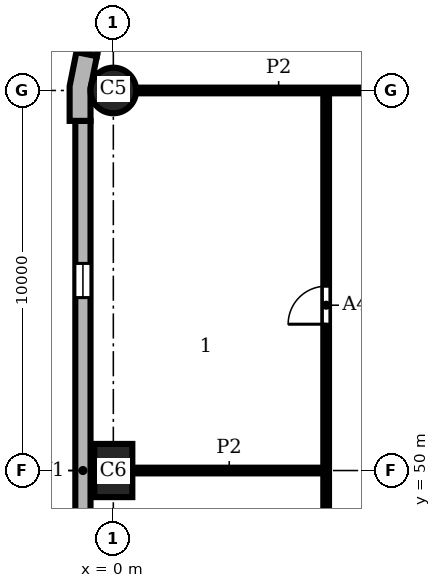
"""IFC4 building model, lengths in metres.
Left out: names, types, materials, properties, quantities, classifications, styles, units other than length and angle.
Written with IfcOpenShell. Run it as: python <this file> out.ifc"""

import sys

from ifc_helpers import new_model, si_unit, direction, frame, frame_2d, origin, origin_2d, place, context, subcontext, project, spatial, polyline, rectangle, circle, outline, extrude, element, fill, save


model = new_model("IFC4")
c1 = context("Model", 3, precision=1e-05, world=origin(), true_north=direction((0.0, 1.0)))
c2 = subcontext(c1, "Body", "Model", "MODEL_VIEW")
j1 = project(units=[si_unit("LENGTHUNIT", "METRE"), si_unit("PLANEANGLEUNIT", "RADIAN")], contexts=[c1])
p1 = place(None, origin())
s1 = spatial("IfcSite", under=j1, at=p1, CompositionType="ELEMENT")
p2 = place(p1, origin())
s2 = spatial("IfcBuilding", under=s1, at=p2, CompositionType="ELEMENT")
p3 = place(p2, frame((0.0, 0.0, 47.1)))
s3 = spatial("IfcBuildingStorey", under=s2, at=p3, CompositionType="ELEMENT", Elevation=47.1)
p4 = place(p3, frame((0.0, 60.0, 0.0), z_axis=(0.0, 0.0, 1.0), x_axis=(1.0, 0.0, 0.0)))
e1 = element("IfcColumn", 1, at=p4, inside=s3, PredefinedType="COLUMN", context=c2, shape_type="SweptSolid", body=[
    extrude(circle(Radius=0.6, at=origin_2d()), origin(), (0.0, 0.0, 1.0), 3.9),
])
p5 = place(p3, frame((0.0, 50.0, 0.0), z_axis=(0.0, 0.0, 1.0), x_axis=(0.0, 1.0, 0.0)))
e2 = element("IfcColumn", 2, at=p5, inside=s3, PredefinedType="COLUMN", context=c2, shape_type="SweptSolid", body=[
    extrude(rectangle(XDim=1.4, YDim=1.0, at=origin_2d()), origin(), (0.0, 0.0, 1.0), 3.9),
])
p6 = place(p3, origin())
e3 = element("IfcWall", 3, at=p6, inside=s3, PredefinedType="SOLIDWALL", context=c2, shape_type="SweptSolid", body=[
    extrude(outline(polyline([(-0.825, 60.98), (-0.972, 61.009), (-1.15, 60.113), (-1.15, 59.2), (-1.0, 59.2), (-0.6, 59.2), (-0.6, 60.059), (-0.432, 60.902), (-0.825, 60.98)])), origin(), (0.0, 0.0, 1.0), 3.9),
])
p7 = place(p3, frame((0.299, 65.602, 0.0), z_axis=(0.0, 0.0, 1.0), x_axis=(-0.195098533057, -0.98078364709, 0.0)))
e4 = element("IfcWall", 4, at=p7, inside=s3, PredefinedType="SOLIDWALL", context=c2, shape_type="SweptSolid", body=[
    extrude(rectangle(XDim=4.753, YDim=0.4, at=frame_2d((2.376, 0.0))), origin(), (0.0, 0.0, 1.0), 3.9),
])
p8 = place(p7, frame((0.226, 0.0, 0.9)))
e5 = element("IfcOpeningElement", 5, at=p8, cuts=e4, PredefinedType="OPENING", context=c2, shape_type="SweptSolid", body=[
    extrude(rectangle(XDim=4.3, YDim=2.35, at=frame_2d((2.15, 1.175))), frame((0.0, 0.21, 0.0), z_axis=(0.0, -1.0, 0.0), x_axis=(1.0, 0.0, 0.0)), (0.0, 0.0, 1.0), 0.42),
])
p9 = place(p3, frame((-0.8, 59.2, 0.0), z_axis=(0.0, 0.0, 1.0), x_axis=(0.0, -1.0, 0.0)))
e6 = element("IfcWall", 6, at=p9, inside=s3, PredefinedType="SOLIDWALL", context=c2, shape_type="SweptSolid", body=[
    extrude(rectangle(XDim=18.4, YDim=0.4, at=frame_2d((9.2, 0.0))), origin(), (0.0, 0.0, 1.0), 3.9),
])
p10 = place(p9, frame((3.75, 0.0, 0.9)))
e7 = element("IfcOpeningElement", 7, at=p10, cuts=e6, PredefinedType="OPENING", context=c2, shape_type="SweptSolid", body=[
    extrude(rectangle(XDim=0.9, YDim=2.35, at=frame_2d((0.45, 1.175))), frame((0.0, 0.21, 0.0), z_axis=(0.0, -1.0, 0.0), x_axis=(1.0, 0.0, 0.0)), (0.0, 0.0, 1.0), 0.42),
])
p11 = place(p9, frame((13.75, 0.0, 0.9)))
e8 = element("IfcOpeningElement", 8, at=p11, cuts=e6, PredefinedType="OPENING", context=c2, shape_type="SweptSolid", body=[
    extrude(rectangle(XDim=0.9, YDim=2.35, at=frame_2d((0.45, 1.175))), frame((0.0, 0.21, 0.0), z_axis=(0.0, -1.0, 0.0), x_axis=(1.0, 0.0, 0.0)), (0.0, 0.0, 1.0), 0.42),
])
p12 = place(p3, frame((5.6, 5.6, 0.0), z_axis=(0.0, 0.0, 1.0), x_axis=(0.0, 1.0, 0.0)))
e9 = element("IfcWall", 9, at=p12, inside=s3, PredefinedType="PARTITIONING", context=c2, shape_type="SweptSolid", body=[
    extrude(rectangle(XDim=54.4, YDim=0.15, at=frame_2d((27.2, 0.0))), origin(), (0.0, 0.0, 1.0), 3.58),
])
p13 = place(p12, frame((5.0, 0.0, 0.0)))
e10 = element("IfcOpeningElement", 10, at=p13, cuts=e9, PredefinedType="OPENING", context=c2, shape_type="SweptSolid", body=[
    extrude(rectangle(XDim=1.0, YDim=2.1, at=frame_2d((0.5, 1.05))), frame((0.0, 0.085, 0.0), z_axis=(0.0, -1.0, 0.0), x_axis=(1.0, 0.0, 0.0)), (0.0, 0.0, 1.0), 0.17),
])
p14 = place(p12, frame((11.75, 0.0, 0.0)))
e11 = element("IfcOpeningElement", 11, at=p14, cuts=e9, PredefinedType="OPENING", context=c2, shape_type="SweptSolid", body=[
    extrude(rectangle(XDim=1.0, YDim=2.1, at=frame_2d((0.5, 1.05))), frame((0.0, 0.085, 0.0), z_axis=(0.0, -1.0, 0.0), x_axis=(1.0, 0.0, 0.0)), (0.0, 0.0, 1.0), 0.17),
])
p15 = place(p12, frame((19.25, 0.0, 0.0)))
e12 = element("IfcOpeningElement", 12, at=p15, cuts=e9, PredefinedType="OPENING", context=c2, shape_type="SweptSolid", body=[
    extrude(rectangle(XDim=1.0, YDim=2.1, at=frame_2d((0.5, 1.05))), frame((0.0, 0.085, 0.0), z_axis=(0.0, -1.0, 0.0), x_axis=(1.0, 0.0, 0.0)), (0.0, 0.0, 1.0), 0.17),
])
p16 = place(p12, frame((29.8, 0.0, 0.0)))
e13 = element("IfcOpeningElement", 13, at=p16, cuts=e9, PredefinedType="OPENING", context=c2, shape_type="SweptSolid", body=[
    extrude(rectangle(XDim=1.0, YDim=2.1, at=frame_2d((0.5, 1.05))), frame((0.0, 0.085, 0.0), z_axis=(0.0, -1.0, 0.0), x_axis=(1.0, 0.0, 0.0)), (0.0, 0.0, 1.0), 0.17),
])
p17 = place(p12, frame((38.0, 0.0, 0.0)))
e14 = element("IfcOpeningElement", 14, at=p17, cuts=e9, PredefinedType="OPENING", context=c2, shape_type="SweptSolid", body=[
    extrude(rectangle(XDim=1.0, YDim=2.1, at=frame_2d((0.5, 1.05))), frame((0.0, 0.085, 0.0), z_axis=(0.0, -1.0, 0.0), x_axis=(1.0, 0.0, 0.0)), (0.0, 0.0, 1.0), 0.17),
])
p18 = place(p12, frame((48.25, 0.0, 0.0)))
e15 = element("IfcOpeningElement", 15, at=p18, cuts=e9, PredefinedType="OPENING", context=c2, shape_type="SweptSolid", body=[
    extrude(rectangle(XDim=1.0, YDim=2.1, at=frame_2d((0.5, 1.05))), frame((0.0, 0.085, 0.0), z_axis=(0.0, -1.0, 0.0), x_axis=(1.0, 0.0, 0.0)), (0.0, 0.0, 1.0), 0.17),
])
p19 = place(p3, frame((0.5, 50.0, 0.0), z_axis=(0.0, 0.0, 1.0), x_axis=(1.0, 0.0, 0.0)))
e16 = element("IfcWall", 16, at=p19, inside=s3, PredefinedType="PARTITIONING", context=c2, shape_type="SweptSolid", body=[
    extrude(rectangle(XDim=5.1, YDim=0.15, at=frame_2d((2.55, 0.0))), origin(), (0.0, 0.0, 1.0), 3.58),
])
p20 = place(p3, frame((0.6, 60.0, 0.0), z_axis=(0.0, 0.0, 1.0), x_axis=(1.0, 0.0, 0.0)))
e17 = element("IfcWall", 17, at=p20, inside=s3, PredefinedType="PARTITIONING", context=c2, shape_type="SweptSolid", body=[
    extrude(rectangle(XDim=7.5, YDim=0.15, at=frame_2d((3.75, 0.0))), origin(), (0.0, 0.0, 1.0), 3.58),
])
p21 = place(p10, origin())
e18 = element("IfcWindow", 18, at=p21, inside=s3, PartitioningType="SINGLE_PANEL", PredefinedType="WINDOW", context=c2, shape_type="SweptSolid", body=[
    extrude(rectangle(XDim=0.9, YDim=2.35, at=frame_2d((0.45, 1.175))), frame((0.0, 0.16, 0.0), z_axis=(0.0, -1.0, 0.0), x_axis=(1.0, 0.0, 0.0)), (0.0, 0.0, 1.0), 0.06),
])
fill(e7, e18)
p22 = place(p18, origin())
e19 = element("IfcDoor", 19, at=p22, inside=s3, OperationType="SINGLE_SWING_LEFT", PredefinedType="DOOR", context=c2, shape_type="SweptSolid", body=[
    extrude(rectangle(XDim=1.0, YDim=2.1, at=frame_2d((0.5, 1.05))), frame((0.0, 0.025, 0.0), z_axis=(0.0, -1.0, 0.0), x_axis=(1.0, 0.0, 0.0)), (0.0, 0.0, 1.0), 0.05),
])
fill(e15, e19)
save(model, sys.argv[1])
